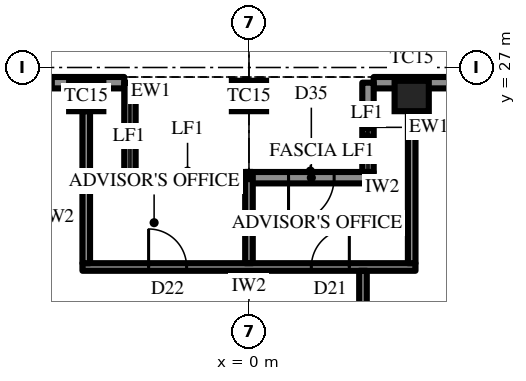
"""IFC4 building model, lengths in metres.
Left out: names, types, materials, properties, quantities, classifications, styles, units other than length and angle.
Written with IfcOpenShell. Run it as: python <this file> out.ifc"""

import sys

from ifc_helpers import new_model, si_unit, direction, frame, frame_2d, origin, origin_2d, place, context, subcontext, project, spatial, rectangle, extrude, element, fill, save


model = new_model("IFC4")
c1 = context("Model", 3, precision=1e-05, world=origin(), true_north=direction((0.0, 1.0)))
c2 = subcontext(c1, "Body", "Model", "MODEL_VIEW")
j1 = project(units=[si_unit("LENGTHUNIT", "METRE"), si_unit("PLANEANGLEUNIT", "RADIAN")], contexts=[c1])
p1 = place(None, origin())
s1 = spatial("IfcSite", under=j1, at=p1, CompositionType="ELEMENT")
p2 = place(p1, origin())
s2 = spatial("IfcBuilding", under=s1, at=p2, CompositionType="ELEMENT")
p3 = place(p2, frame((0.0, 0.0, 370.3)))
s3 = spatial("IfcBuildingStorey", under=s2, at=p3, CompositionType="ELEMENT", Elevation=370.3)
for number, where, z_axis, x_axis in (
    (1, (4.282, 26.25, 0.0), (0.0, 0.0, 1.0), (-1.0, 0.0, 0.0)),
    (2, (0.0, 26.25, 0.0), (0.0, 0.0, 1.0), (-1.0, 0.0, 0.0)),
    (3, (-4.282, 26.25, 0.0), (0.0, 0.0, 1.0), (-1.0, 0.0, 0.0)),
):
    element("IfcColumn", number, at=place(p3, frame(where, z_axis=z_axis, x_axis=x_axis)), inside=s3, PredefinedType="COLUMN", context=c2, shape_type="SweptSolid", body=[
        extrude(rectangle(XDim=0.9, YDim=0.8, at=origin_2d()), origin(), (0.0, 0.0, 1.0), 4.2),
    ])
p4 = place(p3, frame((12.846, 26.6, 0.0), z_axis=(0.0, 0.0, 1.0), x_axis=(-1.0, 0.0, 0.0)))
e4 = element("IfcWall", 4, at=p4, inside=s3, PredefinedType="SOLIDWALL", context=c2, shape_type="SweptSolid", body=[
    extrude(rectangle(XDim=9.564, YDim=0.3, at=frame_2d((4.782, 0.0))), origin(), (0.0, 0.0, 1.0), 2.9),
])
p5 = place(p4, frame((0.866, 0.0, 0.6)))
e5 = element("IfcOpeningElement", 5, at=p5, cuts=e4, PredefinedType="OPENING", context=c2, shape_type="SweptSolid", body=[
    extrude(rectangle(XDim=2.55, YDim=2.05, at=frame_2d((1.275, 1.025))), frame((0.0, 0.16, 0.0), z_axis=(0.0, -1.0, 0.0), x_axis=(1.0, 0.0, 0.0)), (0.0, 0.0, 1.0), 0.32),
])
p6 = place(p4, frame((5.823, 0.0, 0.0)))
e6 = element("IfcOpeningElement", 6, at=p6, cuts=e4, PredefinedType="OPENING", context=c2, shape_type="SweptSolid", body=[
    extrude(rectangle(XDim=1.2, YDim=2.4, at=frame_2d((0.6, 1.2))), frame((0.0, 0.16, 0.0), z_axis=(0.0, -1.0, 0.0), x_axis=(1.0, 0.0, 0.0)), (0.0, 0.0, 1.0), 0.32),
])
p7 = place(p3, frame((-3.282, 26.6, 0.0), z_axis=(0.0, 0.0, 1.0), x_axis=(-1.0, 0.0, 0.0)))
e7 = element("IfcWall", 7, at=p7, inside=s3, PredefinedType="SOLIDWALL", context=c2, shape_type="SweptSolid", body=[
    extrude(rectangle(XDim=9.564, YDim=0.3, at=frame_2d((4.782, 0.0))), origin(), (0.0, 0.0, 1.0), 2.9),
])
p8 = place(p7, frame((1.866, 0.0, 0.6)))
e8 = element("IfcOpeningElement", 8, at=p8, cuts=e7, PredefinedType="OPENING", context=c2, shape_type="SweptSolid", body=[
    extrude(rectangle(XDim=2.55, YDim=2.05, at=frame_2d((1.275, 1.025))), frame((0.0, 0.16, 0.0), z_axis=(0.0, -1.0, 0.0), x_axis=(1.0, 0.0, 0.0)), (0.0, 0.0, 1.0), 0.32),
])
p9 = place(p7, frame((6.148, 0.0, 0.6)))
e9 = element("IfcOpeningElement", 9, at=p9, cuts=e7, PredefinedType="OPENING", context=c2, shape_type="SweptSolid", body=[
    extrude(rectangle(XDim=2.55, YDim=2.05, at=frame_2d((1.275, 1.025))), frame((0.0, 0.16, 0.0), z_axis=(0.0, -1.0, 0.0), x_axis=(1.0, 0.0, 0.0)), (0.0, 0.0, 1.0), 0.32),
])
for number, where, z_axis, x_axis in (
    (10, (3.132, 26.6, 0.0), (0.0, 0.0, 1.0), (0.0, -1.0, 0.0)),
    (11, (-3.132, 26.6, 0.0), (0.0, 0.0, 1.0), (0.0, -1.0, 0.0)),
):
    element("IfcWall", number, at=place(p3, frame(where, z_axis=z_axis, x_axis=x_axis)), inside=s3, PredefinedType="SOLIDWALL", context=c2, shape_type="SweptSolid", body=[
        extrude(rectangle(XDim=2.35, YDim=0.3, at=frame_2d((1.175, 0.0))), origin(), (0.0, 0.0, 1.0), 2.9),
    ])
p10 = place(p3, frame((3.282, 24.1, 0.0), z_axis=(0.0, 0.0, 1.0), x_axis=(-1.0, 0.0, 0.0)))
e12 = element("IfcWall", 12, at=p10, inside=s3, PredefinedType="SOLIDWALL", context=c2, shape_type="SweptSolid", body=[
    extrude(rectangle(XDim=6.564, YDim=0.3, at=frame_2d((3.282, 0.0))), origin(), (0.0, 0.0, 1.0), 2.9),
])
p11 = place(p10, frame((1.041, 0.0, 0.0)))
e13 = element("IfcOpeningElement", 13, at=p11, cuts=e12, PredefinedType="OPENING", context=c2, shape_type="SweptSolid", body=[
    extrude(rectangle(XDim=1.2, YDim=2.4, at=frame_2d((0.6, 1.2))), frame((0.0, 0.16, 0.0), z_axis=(0.0, -1.0, 0.0), x_axis=(1.0, 0.0, 0.0)), (0.0, 0.0, 1.0), 0.32),
])
p12 = place(p3, frame((4.382, 21.75, 0.0), z_axis=(0.0, 0.0, 1.0), x_axis=(-1.0, 0.0, 0.0)))
e14 = element("IfcWall", 14, at=p12, inside=s3, PredefinedType="PARTITIONING", context=c2, shape_type="SweptSolid", body=[
    extrude(rectangle(XDim=8.764, YDim=0.2, at=frame_2d((4.382, 0.0))), origin(), (0.0, 0.0, 1.0), 4.0),
])
p13 = place(p12, frame((1.741, 0.0, 0.0)))
e15 = element("IfcOpeningElement", 15, at=p13, cuts=e14, PredefinedType="OPENING", context=c2, shape_type="SweptSolid", body=[
    extrude(rectangle(XDim=1.0, YDim=2.2, at=frame_2d((0.5, 1.1))), frame((0.0, 0.11, 0.0), z_axis=(0.0, -1.0, 0.0), x_axis=(1.0, 0.0, 0.0)), (0.0, 0.0, 1.0), 0.22),
])
p14 = place(p12, frame((6.023, 0.0, 0.0)))
e16 = element("IfcOpeningElement", 16, at=p14, cuts=e14, PredefinedType="OPENING", context=c2, shape_type="SweptSolid", body=[
    extrude(rectangle(XDim=1.0, YDim=2.2, at=frame_2d((0.5, 1.1))), frame((0.0, 0.11, 0.0), z_axis=(0.0, -1.0, 0.0), x_axis=(1.0, 0.0, 0.0)), (0.0, 0.0, 1.0), 0.22),
])
p15 = place(p3, frame((4.282, 21.85, 0.0), z_axis=(0.0, 0.0, 1.0), x_axis=(0.0, 1.0, 0.0)))
e17 = element("IfcWall", 17, at=p15, inside=s3, PredefinedType="PARTITIONING", context=c2, shape_type="SweptSolid", body=[
    extrude(rectangle(XDim=4.0, YDim=0.2, at=frame_2d((2.0, 0.0))), origin(), (0.0, 0.0, 1.0), 2.992),
])
p16 = place(p3, frame((0.0, 21.85, 0.0), z_axis=(0.0, 0.0, 1.0), x_axis=(0.0, 1.0, 0.0)))
e18 = element("IfcWall", 18, at=p16, inside=s3, PredefinedType="PARTITIONING", context=c2, shape_type="SweptSolid", body=[
    extrude(rectangle(XDim=2.401, YDim=0.2, at=frame_2d((1.2, 0.0))), origin(), (0.0, 0.0, 1.0), 2.992),
])
p17 = place(p3, frame((-4.282, 21.85, 0.0), z_axis=(0.0, 0.0, 1.0), x_axis=(0.0, 1.0, 0.0)))
e19 = element("IfcWall", 19, at=p17, inside=s3, PredefinedType="PARTITIONING", context=c2, shape_type="SweptSolid", body=[
    extrude(rectangle(XDim=4.0, YDim=0.2, at=frame_2d((2.0, 0.0))), origin(), (0.0, 0.0, 1.0), 2.992),
])
p18 = place(p3, frame((3.0, 18.2, 0.0), z_axis=(0.0, 0.0, 1.0), x_axis=(0.0, 1.0, 0.0)))
e20 = element("IfcWall", 20, at=p18, inside=s3, PredefinedType="PARTITIONING", context=c2, shape_type="SweptSolid", body=[
    extrude(rectangle(XDim=3.45, YDim=0.2, at=frame_2d((1.725, 0.0))), origin(), (0.0, 0.0, 1.0), 4.0),
])
p19 = place(p8, origin())
e21 = element("IfcWindow", 21, at=p19, inside=s3, PartitioningType="SINGLE_PANEL", PredefinedType="WINDOW", context=c2, shape_type="SweptSolid", body=[
    extrude(rectangle(XDim=2.55, YDim=2.05, at=frame_2d((1.275, 1.025))), frame((0.0, 0.03, 0.0), z_axis=(0.0, -1.0, 0.0), x_axis=(1.0, 0.0, 0.0)), (0.0, 0.0, 1.0), 0.06),
])
fill(e8, e21)
p20 = place(p11, origin())
e22 = element("IfcDoor", 22, at=p20, inside=s3, OperationType="SINGLE_SWING_LEFT", PredefinedType="DOOR", context=c2, shape_type="SweptSolid", body=[
    extrude(rectangle(XDim=1.2, YDim=2.4, at=frame_2d((0.6, 1.2))), frame((0.0, 0.025, 0.0), z_axis=(0.0, -1.0, 0.0), x_axis=(1.0, 0.0, 0.0)), (0.0, 0.0, 1.0), 0.05),
])
fill(e13, e22)
p21 = place(p13, frame((1.0, 0.0, 0.0), z_axis=(0.0, 0.0, 1.0), x_axis=(-1.0, 0.0, 0.0)))
e23 = element("IfcDoor", 23, at=p21, inside=s3, OperationType="SINGLE_SWING_LEFT", PredefinedType="DOOR", context=c2, shape_type="SweptSolid", body=[
    extrude(rectangle(XDim=1.0, YDim=2.2, at=frame_2d((0.5, 1.1))), frame((0.0, 0.025, 0.0), z_axis=(0.0, -1.0, 0.0), x_axis=(1.0, 0.0, 0.0)), (0.0, 0.0, 1.0), 0.05),
])
fill(e15, e23)
p22 = place(p14, frame((1.0, 0.0, 0.0), z_axis=(0.0, 0.0, 1.0), x_axis=(-1.0, 0.0, 0.0)))
e24 = element("IfcDoor", 24, at=p22, inside=s3, OperationType="SINGLE_SWING_RIGHT", PredefinedType="DOOR", context=c2, shape_type="SweptSolid", body=[
    extrude(rectangle(XDim=1.0, YDim=2.2, at=frame_2d((0.5, 1.1))), frame((0.0, 0.025, 0.0), z_axis=(0.0, -1.0, 0.0), x_axis=(1.0, 0.0, 0.0)), (0.0, 0.0, 1.0), 0.05),
])
fill(e16, e24)
save(model, sys.argv[1])
